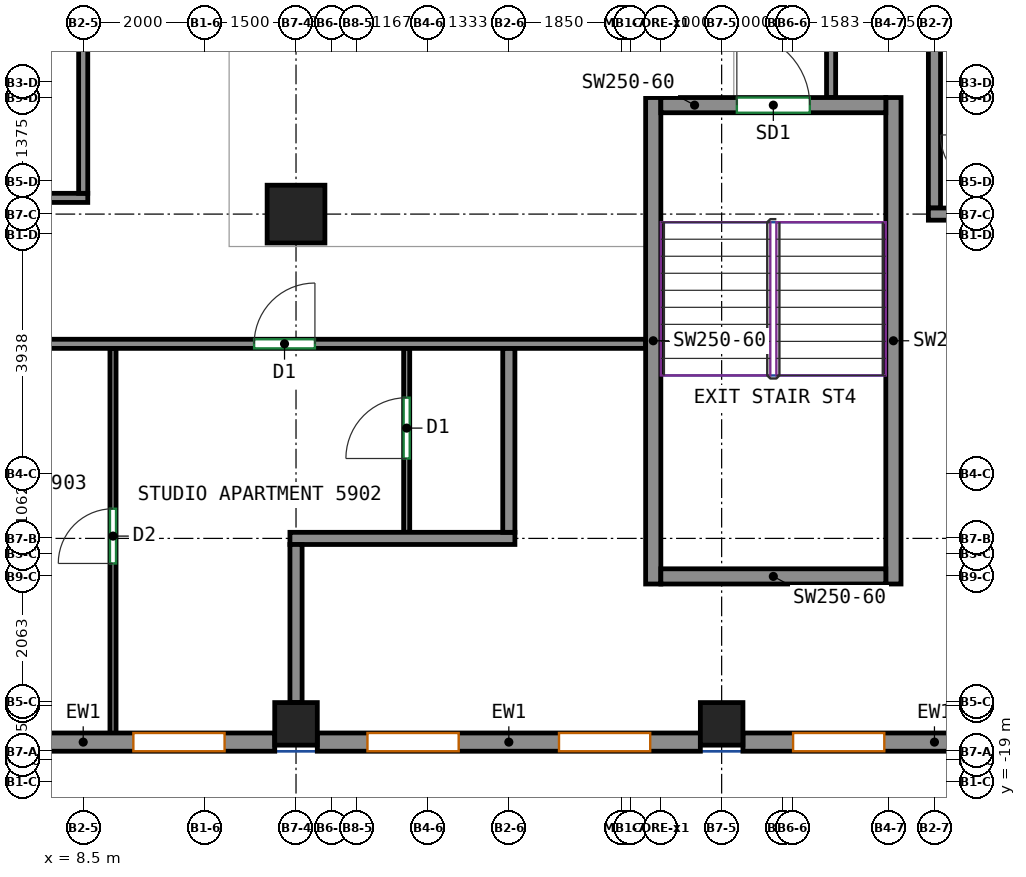
"""IFC4 building model, lengths in metres.
Left out: names, types, materials, properties, quantities, classifications, styles, units other than length and angle.
Written with IfcOpenShell. Run it as: python <this file> out.ifc"""

import sys

from ifc_helpers import new_model, si_unit, direction, frame, frame_2d, origin, origin_2d, place, context, subcontext, project, spatial, rectangle, extrude, source, transform, mapped, element, fill, save


model = new_model("IFC4")
c1 = context("Model", 3, precision=1e-05, world=origin(), true_north=direction((0.0, 1.0)))
c2 = subcontext(c1, "Body", "Model", "MODEL_VIEW")
j1 = project(units=[si_unit("LENGTHUNIT", "METRE"), si_unit("PLANEANGLEUNIT", "RADIAN")], contexts=[c1])
p1 = place(None, origin())
s1 = spatial("IfcSite", under=j1, at=p1, CompositionType="ELEMENT")
p2 = place(p1, origin())
s2 = spatial("IfcBuilding", under=s1, at=p2, CompositionType="ELEMENT")
p3 = place(p2, frame((0.0, 0.0, 245.8)))
s3 = spatial("IfcBuildingStorey", under=s2, at=p3, CompositionType="ELEMENT", Elevation=245.8)
m1 = source(origin(), c2, "Body", "SweptSolid", [
    extrude(rectangle(XDim=0.7, YDim=0.7, at=origin_2d()), origin(), (0.0, 0.0, 1.0), 3.12),
])
p4 = place(p3, frame((12.0, -18.05, 0.0), z_axis=(0.0, 0.0, 1.0), x_axis=(1.0, 0.0, 0.0)))
e1 = element("IfcColumn", 1, at=p4, inside=s3, PredefinedType="COLUMN", context=c2, shape_type="MappedRepresentation", body=[
    mapped(m1, transform((0.0, 0.0, 0.0))),
])
m2 = source(origin(), c2, "Body", "SweptSolid", [
    extrude(rectangle(XDim=0.95, YDim=0.95, at=origin_2d()), origin(), (0.0, 0.0, 1.0), 3.12),
])
p5 = place(p3, frame((12.0, -9.667, 0.0), z_axis=(0.0, 0.0, 1.0), x_axis=(1.0, 0.0, 0.0)))
e2 = element("IfcColumn", 2, at=p5, inside=s3, PredefinedType="COLUMN", context=c2, shape_type="MappedRepresentation", body=[
    mapped(m2, transform((0.0, 0.0, 0.0))),
])
p6 = place(p3, frame((19.0, -18.05, 0.0), z_axis=(0.0, 0.0, 1.0), x_axis=(1.0, 0.0, 0.0)))
e3 = element("IfcColumn", 3, at=p6, inside=s3, PredefinedType="COLUMN", context=c2, shape_type="MappedRepresentation", body=[
    mapped(m1, transform((0.0, 0.0, 0.0))),
])
m3 = source(origin(), c2, "Body", "SweptSolid", [
    extrude(rectangle(XDim=8.0, YDim=0.25, at=frame_2d((4.0, 0.0))), origin(), (0.0, 0.0, 1.0), 3.12),
])
for number, where, z_axis, x_axis in (
    (4, (17.875, -15.75, 0.0), (0.0, 0.0, 1.0), (0.0, 1.0, 0.0)),
    (5, (21.825, -15.75, 0.0), (0.0, 0.0, 1.0), (0.0, 1.0, 0.0)),
):
    element("IfcWall", number, at=place(p3, frame(where, z_axis=z_axis, x_axis=x_axis)), inside=s3, PredefinedType="SHEAR", context=c2, shape_type="MappedRepresentation", body=[
        mapped(m3, transform((0.0, 0.0, 0.0))),
    ])
m4 = source(origin(), c2, "Body", "SweptSolid", [
    extrude(rectangle(XDim=3.7, YDim=0.25, at=frame_2d((1.85, 0.0))), origin(), (0.0, 0.0, 1.0), 3.12),
])
p7 = place(p3, frame((18.0, -15.625, 0.0), z_axis=(0.0, 0.0, 1.0), x_axis=(1.0, 0.0, 0.0)))
e6 = element("IfcWall", 6, at=p7, inside=s3, PredefinedType="SHEAR", context=c2, shape_type="MappedRepresentation", body=[
    mapped(m4, transform((0.0, 0.0, 0.0))),
])
p8 = place(p3, frame((18.0, -7.875, 0.0), z_axis=(0.0, 0.0, 1.0), x_axis=(1.0, 0.0, 0.0)))
e7 = element("IfcWall", 7, at=p8, inside=s3, PredefinedType="SHEAR", context=c2, shape_type="MappedRepresentation", body=[
    mapped(m4, transform((0.0, 0.0, 0.0))),
])
p9 = place(p8, frame((1.25, 0.0, 0.0)))
e8 = element("IfcOpeningElement", 8, at=p9, cuts=e7, PredefinedType="OPENING", context=c2, shape_type="SweptSolid", body=[
    extrude(rectangle(XDim=1.2, YDim=2.1, at=frame_2d((0.6, 1.05))), frame((0.0, 0.135, 0.0), z_axis=(0.0, -1.0, 0.0), x_axis=(1.0, 0.0, 0.0)), (0.0, 0.0, 1.0), 0.27),
])
m5 = source(origin(), c2, "Body", "SweptSolid", [
    extrude(rectangle(XDim=6.3, YDim=0.3, at=frame_2d((3.15, 0.0))), origin(), (0.0, 0.0, 1.0), 3.12),
])
p10 = place(p3, frame((5.35, -18.35, 0.0), z_axis=(0.0, 0.0, 1.0), x_axis=(1.0, 0.0, 0.0)))
e9 = element("IfcWall", 9, at=p10, inside=s3, PredefinedType="SOLIDWALL", context=c2, shape_type="MappedRepresentation", body=[
    mapped(m5, transform((0.0, 0.0, 0.0))),
])
p11 = place(p10, frame((0.825, 0.0, 0.8)))
e10 = element("IfcOpeningElement", 10, at=p11, cuts=e9, PredefinedType="OPENING", context=c2, shape_type="SweptSolid", body=[
    extrude(rectangle(XDim=1.5, YDim=2.05, at=frame_2d((0.75, 1.025))), frame((0.0, 0.16, 0.0), z_axis=(0.0, -1.0, 0.0), x_axis=(1.0, 0.0, 0.0)), (0.0, 0.0, 1.0), 0.32),
])
p12 = place(p10, frame((3.975, 0.0, 0.8)))
e11 = element("IfcOpeningElement", 11, at=p12, cuts=e9, PredefinedType="OPENING", context=c2, shape_type="SweptSolid", body=[
    extrude(rectangle(XDim=1.5, YDim=2.05, at=frame_2d((0.75, 1.025))), frame((0.0, 0.16, 0.0), z_axis=(0.0, -1.0, 0.0), x_axis=(1.0, 0.0, 0.0)), (0.0, 0.0, 1.0), 0.32),
])
p13 = place(p3, frame((12.35, -18.35, 0.0), z_axis=(0.0, 0.0, 1.0), x_axis=(1.0, 0.0, 0.0)))
e12 = element("IfcWall", 12, at=p13, inside=s3, PredefinedType="SOLIDWALL", context=c2, shape_type="MappedRepresentation", body=[
    mapped(m5, transform((0.0, 0.0, 0.0))),
])
p14 = place(p13, frame((0.825, 0.0, 0.8)))
e13 = element("IfcOpeningElement", 13, at=p14, cuts=e12, PredefinedType="OPENING", context=c2, shape_type="SweptSolid", body=[
    extrude(rectangle(XDim=1.5, YDim=2.05, at=frame_2d((0.75, 1.025))), frame((0.0, 0.16, 0.0), z_axis=(0.0, -1.0, 0.0), x_axis=(1.0, 0.0, 0.0)), (0.0, 0.0, 1.0), 0.32),
])
p15 = place(p13, frame((3.975, 0.0, 0.8)))
e14 = element("IfcOpeningElement", 14, at=p15, cuts=e12, PredefinedType="OPENING", context=c2, shape_type="SweptSolid", body=[
    extrude(rectangle(XDim=1.5, YDim=2.05, at=frame_2d((0.75, 1.025))), frame((0.0, 0.16, 0.0), z_axis=(0.0, -1.0, 0.0), x_axis=(1.0, 0.0, 0.0)), (0.0, 0.0, 1.0), 0.32),
])
p16 = place(p3, frame((19.35, -18.35, 0.0), z_axis=(0.0, 0.0, 1.0), x_axis=(1.0, 0.0, 0.0)))
e15 = element("IfcWall", 15, at=p16, inside=s3, PredefinedType="SOLIDWALL", context=c2, shape_type="MappedRepresentation", body=[
    mapped(m5, transform((0.0, 0.0, 0.0))),
])
p17 = place(p16, frame((0.825, 0.0, 0.8)))
e16 = element("IfcOpeningElement", 16, at=p17, cuts=e15, PredefinedType="OPENING", context=c2, shape_type="SweptSolid", body=[
    extrude(rectangle(XDim=1.5, YDim=2.05, at=frame_2d((0.75, 1.025))), frame((0.0, 0.16, 0.0), z_axis=(0.0, -1.0, 0.0), x_axis=(1.0, 0.0, 0.0)), (0.0, 0.0, 1.0), 0.32),
])
p18 = place(p16, frame((3.975, 0.0, 0.8)))
e17 = element("IfcOpeningElement", 17, at=p18, cuts=e15, PredefinedType="OPENING", context=c2, shape_type="SweptSolid", body=[
    extrude(rectangle(XDim=1.5, YDim=2.05, at=frame_2d((0.75, 1.025))), frame((0.0, 0.16, 0.0), z_axis=(0.0, -1.0, 0.0), x_axis=(1.0, 0.0, 0.0)), (0.0, 0.0, 1.0), 0.32),
])
p19 = place(p3, frame((-11.8, -11.8, 0.0), z_axis=(0.0, 0.0, 1.0), x_axis=(1.0, 0.0, 0.0)))
e18 = element("IfcWall", 18, at=p19, inside=s3, PredefinedType="PARTITIONING", context=c2, shape_type="SweptSolid", body=[
    extrude(rectangle(XDim=29.55, YDim=0.15, at=frame_2d((14.775, 0.0))), origin(), (0.0, 0.0, 1.0), 3.12),
])
p20 = place(p19, frame((6.21, 0.0, 0.0)))
e19 = element("IfcOpeningElement", 19, at=p20, cuts=e18, PredefinedType="OPENING", context=c2, shape_type="SweptSolid", body=[
    extrude(rectangle(XDim=1.0, YDim=2.1, at=frame_2d((0.5, 1.05))), frame((0.0, 0.085, 0.0), z_axis=(0.0, -1.0, 0.0), x_axis=(1.0, 0.0, 0.0)), (0.0, 0.0, 1.0), 0.17),
])
p21 = place(p19, frame((23.111, 0.0, 0.0)))
e20 = element("IfcOpeningElement", 20, at=p21, cuts=e18, PredefinedType="OPENING", context=c2, shape_type="SweptSolid", body=[
    extrude(rectangle(XDim=1.0, YDim=2.1, at=frame_2d((0.5, 1.05))), frame((0.0, 0.085, 0.0), z_axis=(0.0, -1.0, 0.0), x_axis=(1.0, 0.0, 0.0)), (0.0, 0.0, 1.0), 0.17),
])
p22 = place(p3, frame((20.8, -7.75, 0.0), z_axis=(0.0, 0.0, 1.0), x_axis=(0.0, 1.0, 0.0)))
e21 = element("IfcWall", 21, at=p22, inside=s3, PredefinedType="PARTITIONING", context=c2, shape_type="SweptSolid", body=[
    extrude(rectangle(XDim=2.41, YDim=0.15, at=frame_2d((1.205, 0.0))), origin(), (0.0, 0.0, 1.0), 3.12),
])
p23 = place(p22, frame((1.108, 0.0, 0.0)))
e22 = element("IfcOpeningElement", 22, at=p23, cuts=e21, PredefinedType="OPENING", context=c2, shape_type="SweptSolid", body=[
    extrude(rectangle(XDim=0.9, YDim=2.1, at=frame_2d((0.45, 1.05))), frame((0.0, 0.085, 0.0), z_axis=(0.0, -1.0, 0.0), x_axis=(1.0, 0.0, 0.0)), (0.0, 0.0, 1.0), 0.17),
])
p24 = place(p3, frame((8.575, -9.4, 0.0), z_axis=(0.0, 0.0, 1.0), x_axis=(-1.0, 0.0, 0.0)))
e23 = element("IfcWall", 23, at=p24, inside=s3, PredefinedType="PARTITIONING", context=c2, shape_type="SweptSolid", body=[
    extrude(rectangle(XDim=15.175, YDim=0.15, at=frame_2d((7.587, 0.0))), origin(), (0.0, 0.0, 1.0), 3.12),
])
p25 = place(p24, frame((8.646, 0.0, 0.0)))
e24 = element("IfcOpeningElement", 24, at=p25, cuts=e23, PredefinedType="OPENING", context=c2, shape_type="SweptSolid", body=[
    extrude(rectangle(XDim=1.0, YDim=2.1, at=frame_2d((0.5, 1.05))), frame((0.0, 0.085, 0.0), z_axis=(0.0, -1.0, 0.0), x_axis=(1.0, 0.0, 0.0)), (0.0, 0.0, 1.0), 0.17),
])
p26 = place(p3, frame((8.5, 5.525, 0.0), z_axis=(0.0, 0.0, 1.0), x_axis=(0.0, -1.0, 0.0)))
e25 = element("IfcWall", 25, at=p26, inside=s3, PredefinedType="PARTITIONING", context=c2, shape_type="SweptSolid", body=[
    extrude(rectangle(XDim=14.85, YDim=0.15, at=frame_2d((7.425, 0.0))), origin(), (0.0, 0.0, 1.0), 3.12),
])
p27 = place(p3, frame((8.99, -18.25, 0.0), z_axis=(0.0, 0.0, 1.0), x_axis=(0.0, 1.0, 0.0)))
e26 = element("IfcWall", 26, at=p27, inside=s3, PredefinedType="PARTITIONING", context=c2, shape_type="SweptSolid", body=[
    extrude(rectangle(XDim=6.373, YDim=0.1, at=frame_2d((3.187, 0.0))), origin(), (0.0, 0.0, 1.0), 3.12),
])
p28 = place(p27, frame((2.838, 0.0, 0.0)))
e27 = element("IfcOpeningElement", 27, at=p28, cuts=e26, PredefinedType="OPENING", context=c2, shape_type="SweptSolid", body=[
    extrude(rectangle(XDim=0.9, YDim=2.1, at=frame_2d((0.45, 1.05))), frame((0.0, 0.06, 0.0), z_axis=(0.0, -1.0, 0.0), x_axis=(1.0, 0.0, 0.0)), (0.0, 0.0, 1.0), 0.12),
])
p29 = place(p3, frame((13.82, -14.9, 0.0), z_axis=(0.0, 0.0, 1.0), x_axis=(0.0, 1.0, 0.0)))
e28 = element("IfcWall", 28, at=p29, inside=s3, PredefinedType="PARTITIONING", context=c2, shape_type="SweptSolid", body=[
    extrude(rectangle(XDim=3.023, YDim=0.1, at=frame_2d((1.511, 0.0))), origin(), (0.0, 0.0, 1.0), 3.12),
])
p30 = place(p29, frame((1.214, 0.0, 0.0)))
e29 = element("IfcOpeningElement", 29, at=p30, cuts=e28, PredefinedType="OPENING", context=c2, shape_type="SweptSolid", body=[
    extrude(rectangle(XDim=1.0, YDim=2.1, at=frame_2d((0.5, 1.05))), frame((0.0, 0.06, 0.0), z_axis=(0.0, -1.0, 0.0), x_axis=(1.0, 0.0, 0.0)), (0.0, 0.0, 1.0), 0.12),
])
p31 = place(p3, frame((11.9, -15.0, 0.0), z_axis=(0.0, 0.0, 1.0), x_axis=(1.0, 0.0, 0.0)))
e30 = element("IfcWall", 30, at=p31, inside=s3, PredefinedType="PARTITIONING", context=c2, shape_type="SweptSolid", body=[
    extrude(rectangle(XDim=3.7, YDim=0.2, at=frame_2d((1.85, 0.0))), origin(), (0.0, 0.0, 1.0), 3.12),
])
p32 = place(p3, frame((12.0, -17.7, 0.0), z_axis=(0.0, 0.0, 1.0), x_axis=(0.0, 1.0, 0.0)))
e31 = element("IfcWall", 31, at=p32, inside=s3, PredefinedType="PARTITIONING", context=c2, shape_type="SweptSolid", body=[
    extrude(rectangle(XDim=2.6, YDim=0.2, at=frame_2d((1.3, 0.0))), origin(), (0.0, 0.0, 1.0), 3.12),
])
p33 = place(p3, frame((15.5, -14.9, 0.0), z_axis=(0.0, 0.0, 1.0), x_axis=(0.0, 1.0, 0.0)))
e32 = element("IfcWall", 32, at=p33, inside=s3, PredefinedType="PARTITIONING", context=c2, shape_type="SweptSolid", body=[
    extrude(rectangle(XDim=3.023, YDim=0.2, at=frame_2d((1.511, 0.0))), origin(), (0.0, 0.0, 1.0), 3.12),
])
p34 = place(p3, frame((22.5, -9.567, 0.0), z_axis=(0.0, 0.0, 1.0), x_axis=(0.0, 1.0, 0.0)))
e33 = element("IfcWall", 33, at=p34, inside=s3, PredefinedType="PARTITIONING", context=c2, shape_type="SweptSolid", body=[
    extrude(rectangle(XDim=4.217, YDim=0.2, at=frame_2d((2.108, 0.0))), origin(), (0.0, 0.0, 1.0), 3.12),
])
p35 = place(p3, frame((22.4, -9.667, 0.0), z_axis=(0.0, 0.0, 1.0), x_axis=(1.0, 0.0, 0.0)))
e34 = element("IfcWall", 34, at=p35, inside=s3, PredefinedType="PARTITIONING", context=c2, shape_type="SweptSolid", body=[
    extrude(rectangle(XDim=6.3, YDim=0.2, at=frame_2d((3.15, 0.0))), origin(), (0.0, 0.0, 1.0), 3.12),
])
p36 = place(p12, origin())
e35 = element("IfcWindow", 35, at=p36, inside=s3, PartitioningType="SINGLE_PANEL", PredefinedType="WINDOW", context=c2, shape_type="SweptSolid", body=[
    extrude(rectangle(XDim=1.5, YDim=2.05, at=frame_2d((0.75, 1.025))), frame((0.0, 0.03, 0.0), z_axis=(0.0, -1.0, 0.0), x_axis=(1.0, 0.0, 0.0)), (0.0, 0.0, 1.0), 0.06),
])
fill(e11, e35)
p37 = place(p14, origin())
e36 = element("IfcWindow", 36, at=p37, inside=s3, PartitioningType="SINGLE_PANEL", PredefinedType="WINDOW", context=c2, shape_type="SweptSolid", body=[
    extrude(rectangle(XDim=1.5, YDim=2.05, at=frame_2d((0.75, 1.025))), frame((0.0, 0.03, 0.0), z_axis=(0.0, -1.0, 0.0), x_axis=(1.0, 0.0, 0.0)), (0.0, 0.0, 1.0), 0.06),
])
fill(e13, e36)
p38 = place(p15, origin())
e37 = element("IfcWindow", 37, at=p38, inside=s3, PartitioningType="SINGLE_PANEL", PredefinedType="WINDOW", context=c2, shape_type="SweptSolid", body=[
    extrude(rectangle(XDim=1.5, YDim=2.05, at=frame_2d((0.75, 1.025))), frame((0.0, 0.03, 0.0), z_axis=(0.0, -1.0, 0.0), x_axis=(1.0, 0.0, 0.0)), (0.0, 0.0, 1.0), 0.06),
])
fill(e14, e37)
p39 = place(p17, origin())
e38 = element("IfcWindow", 38, at=p39, inside=s3, PartitioningType="SINGLE_PANEL", PredefinedType="WINDOW", context=c2, shape_type="SweptSolid", body=[
    extrude(rectangle(XDim=1.5, YDim=2.05, at=frame_2d((0.75, 1.025))), frame((0.0, 0.03, 0.0), z_axis=(0.0, -1.0, 0.0), x_axis=(1.0, 0.0, 0.0)), (0.0, 0.0, 1.0), 0.06),
])
fill(e16, e38)
p40 = place(p9, origin())
e39 = element("IfcDoor", 39, at=p40, inside=s3, OperationType="DOUBLE_DOOR_SINGLE_SWING", PredefinedType="DOOR", context=c2, shape_type="SweptSolid", body=[
    extrude(rectangle(XDim=1.2, YDim=2.1, at=frame_2d((0.6, 1.05))), frame((0.0, 0.025, 0.0), z_axis=(0.0, -1.0, 0.0), x_axis=(1.0, 0.0, 0.0)), (0.0, 0.0, 1.0), 0.05),
])
fill(e8, e39)
p41 = place(p28, origin())
e40 = element("IfcDoor", 40, at=p41, inside=s3, OperationType="SINGLE_SWING_LEFT", PredefinedType="DOOR", context=c2, shape_type="SweptSolid", body=[
    extrude(rectangle(XDim=0.9, YDim=2.1, at=frame_2d((0.45, 1.05))), frame((0.0, 0.025, 0.0), z_axis=(0.0, -1.0, 0.0), x_axis=(1.0, 0.0, 0.0)), (0.0, 0.0, 1.0), 0.05),
])
fill(e27, e40)
p42 = place(p30, origin())
e41 = element("IfcDoor", 41, at=p42, inside=s3, OperationType="SINGLE_SWING_LEFT", PredefinedType="DOOR", context=c2, shape_type="SweptSolid", body=[
    extrude(rectangle(XDim=1.0, YDim=2.1, at=frame_2d((0.5, 1.05))), frame((0.0, 0.025, 0.0), z_axis=(0.0, -1.0, 0.0), x_axis=(1.0, 0.0, 0.0)), (0.0, 0.0, 1.0), 0.05),
])
fill(e29, e41)
p43 = place(p21, origin())
e42 = element("IfcDoor", 42, at=p43, inside=s3, OperationType="SINGLE_SWING_RIGHT", PredefinedType="DOOR", context=c2, shape_type="SweptSolid", body=[
    extrude(rectangle(XDim=1.0, YDim=2.1, at=frame_2d((0.5, 1.05))), frame((0.0, 0.025, 0.0), z_axis=(0.0, -1.0, 0.0), x_axis=(1.0, 0.0, 0.0)), (0.0, 0.0, 1.0), 0.05),
])
fill(e20, e42)
save(model, sys.argv[1])
